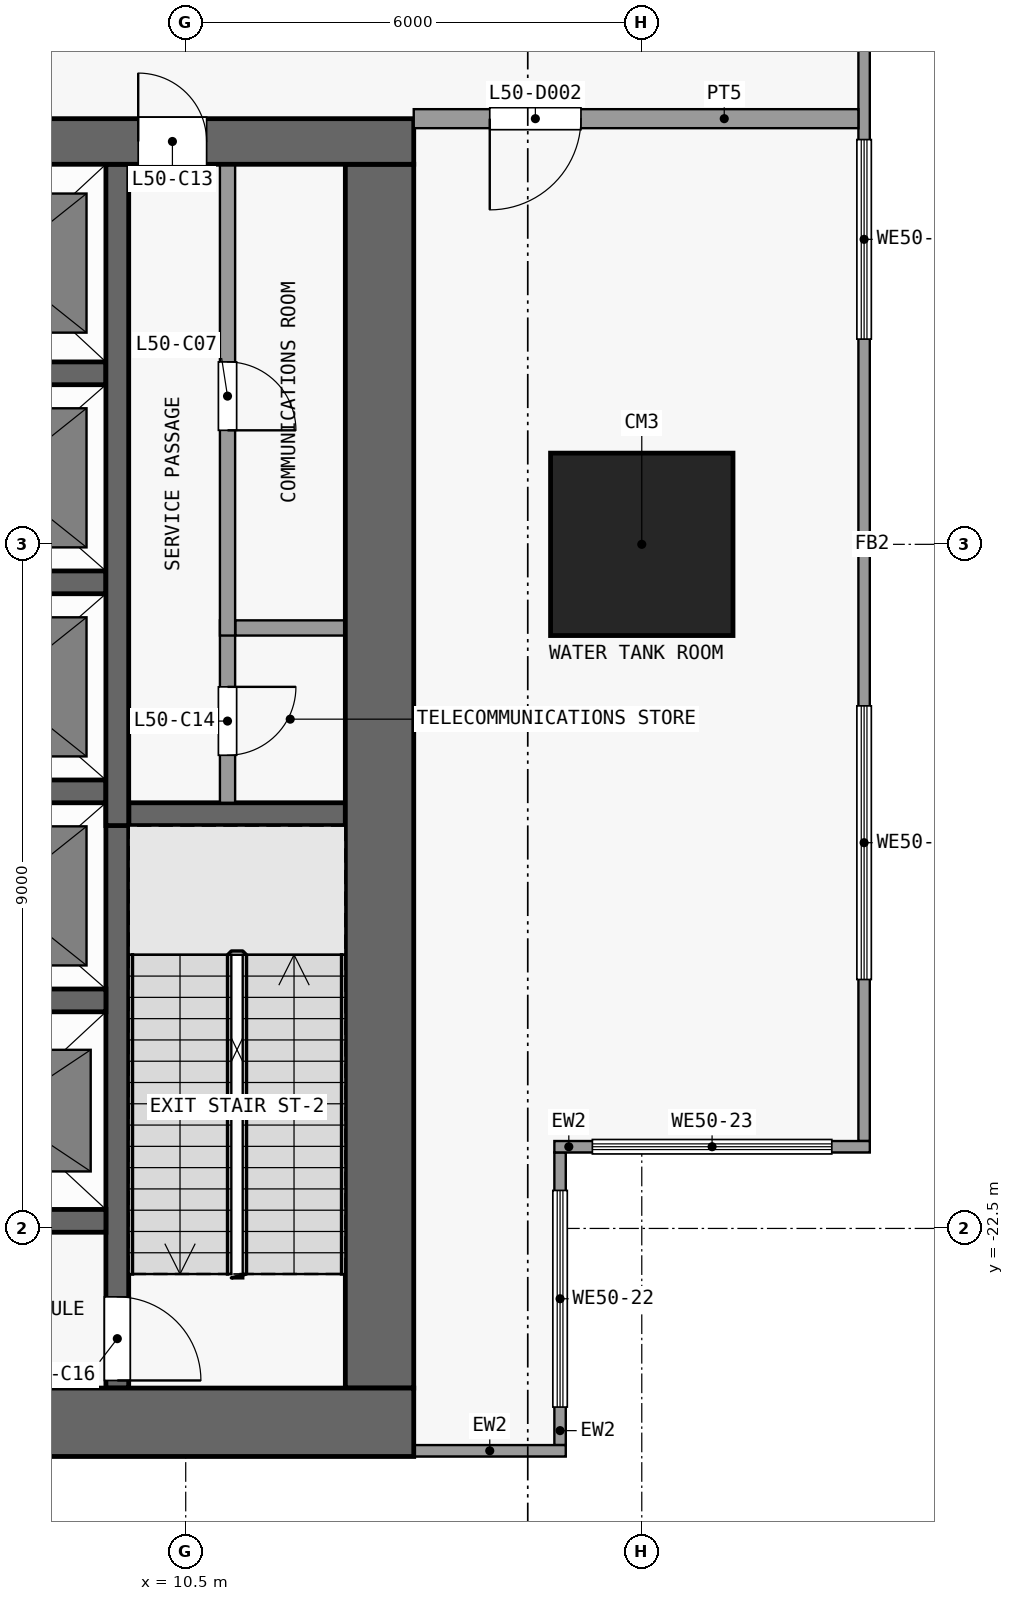
"""IFC4 building model, lengths in metres.
Left out: names, types, materials, properties, quantities, classifications, styles, units other than length and angle.
Written with IfcOpenShell. Run it as: python <this file> out.ifc"""

import sys

from ifc_helpers import new_model, si_unit, direction, frame, frame_2d, origin, origin_2d, place, context, subcontext, project, spatial, rectangle, extrude, element, fill, save


model = new_model("IFC4")
c1 = context("Model", 3, precision=1e-05, world=origin(), true_north=direction((0.0, 1.0)))
c2 = subcontext(c1, "Body", "Model", "MODEL_VIEW")
j1 = project(units=[si_unit("LENGTHUNIT", "METRE"), si_unit("PLANEANGLEUNIT", "RADIAN")], contexts=[c1])
p1 = place(None, origin())
s1 = spatial("IfcSite", under=j1, at=p1, CompositionType="ELEMENT")
p2 = place(p1, origin())
s2 = spatial("IfcBuilding", under=s1, at=p2, CompositionType="ELEMENT")
p3 = place(p2, frame((0.0, 0.0, 199.7)))
s3 = spatial("IfcBuildingStorey", under=s2, at=p3, CompositionType="ELEMENT", Elevation=199.7)
p4 = place(p3, frame((16.5, -13.5, 0.0), z_axis=(0.0, 0.0, 1.0), x_axis=(1.0, 0.0, 0.0)))
e1 = element("IfcColumn", 1, at=p4, inside=s3, PredefinedType="COLUMN", context=c2, shape_type="SweptSolid", body=[
    extrude(rectangle(XDim=2.4, YDim=2.4, at=origin_2d()), origin(), (0.0, 0.0, 1.0), 5.4),
])
p5 = place(p3, frame((-13.5, -25.05, 0.0), z_axis=(0.0, 0.0, 1.0), x_axis=(1.0, 0.0, 0.0)))
e2 = element("IfcWall", 2, at=p5, inside=s3, PredefinedType="SHEAR", context=c2, shape_type="SweptSolid", body=[
    extrude(rectangle(XDim=27.0, YDim=0.9, at=frame_2d((13.5, 0.0))), origin(), (0.0, 0.0, 1.0), 5.0),
])
p6 = place(p3, frame((-13.5, -8.2, 0.0), z_axis=(0.0, 0.0, 1.0), x_axis=(1.0, 0.0, 0.0)))
e3 = element("IfcWall", 3, at=p6, inside=s3, PredefinedType="SHEAR", context=c2, shape_type="SweptSolid", body=[
    extrude(rectangle(XDim=27.0, YDim=0.6, at=frame_2d((13.5, 0.0))), origin(), (0.0, 0.0, 1.0), 5.0),
])
p7 = place(p6, frame((7.8, 0.0, 0.0)))
e4 = element("IfcOpeningElement", 4, at=p7, cuts=e3, PredefinedType="OPENING", context=c2, shape_type="SweptSolid", body=[
    extrude(rectangle(XDim=1.8, YDim=2.1, at=frame_2d((0.9, 1.05))), frame((0.0, 0.31, 0.0), z_axis=(0.0, -1.0, 0.0), x_axis=(1.0, 0.0, 0.0)), (0.0, 0.0, 1.0), 0.62),
])
p8 = place(p6, frame((17.4, 0.0, 0.0)))
e5 = element("IfcOpeningElement", 5, at=p8, cuts=e3, PredefinedType="OPENING", context=c2, shape_type="SweptSolid", body=[
    extrude(rectangle(XDim=1.8, YDim=2.1, at=frame_2d((0.9, 1.05))), frame((0.0, 0.31, 0.0), z_axis=(0.0, -1.0, 0.0), x_axis=(1.0, 0.0, 0.0)), (0.0, 0.0, 1.0), 0.62),
])
p9 = place(p6, frame((1.725, 0.0, 0.0)))
e6 = element("IfcOpeningElement", 6, at=p9, cuts=e3, PredefinedType="OPENING", context=c2, shape_type="SweptSolid", body=[
    extrude(rectangle(XDim=1.2, YDim=2.1, at=frame_2d((0.6, 1.05))), frame((0.0, 0.31, 0.0), z_axis=(0.0, -1.0, 0.0), x_axis=(1.0, 0.0, 0.0)), (0.0, 0.0, 1.0), 0.62),
])
p10 = place(p6, frame((23.375, 0.0, 0.0)))
e7 = element("IfcOpeningElement", 7, at=p10, cuts=e3, PredefinedType="OPENING", context=c2, shape_type="SweptSolid", body=[
    extrude(rectangle(XDim=0.9, YDim=2.1, at=frame_2d((0.45, 1.05))), frame((0.0, 0.31, 0.0), z_axis=(0.0, -1.0, 0.0), x_axis=(1.0, 0.0, 0.0)), (0.0, 0.0, 1.0), 0.62),
])
p11 = place(p3, frame((13.05, -24.6, 0.0), z_axis=(0.0, 0.0, 1.0), x_axis=(0.0, 1.0, 0.0)))
e8 = element("IfcWall", 8, at=p11, inside=s3, PredefinedType="SHEAR", context=c2, shape_type="SweptSolid", body=[
    extrude(rectangle(XDim=16.1, YDim=0.9, at=frame_2d((8.05, 0.0))), origin(), (0.0, 0.0, 1.0), 5.0),
])
for number, where, z_axis, x_axis in (
    (9, (6.65, -22.4, 0.0), (0.0, 0.0, 1.0), (1.0, 0.0, 0.0)),
    (10, (6.65, -19.5, 0.0), (0.0, 0.0, 1.0), (1.0, 0.0, 0.0)),
):
    element("IfcWall", number, at=place(p3, frame(where, z_axis=z_axis, x_axis=x_axis)), inside=s3, PredefinedType="SHEAR", context=c2, shape_type="SweptSolid", body=[
        extrude(rectangle(XDim=2.8, YDim=0.3, at=frame_2d((1.4, 0.0))), origin(), (0.0, 0.0, 1.0), 5.0),
    ])
p12 = place(p3, frame((9.75, -17.05, 0.0), z_axis=(0.0, 0.0, 1.0), x_axis=(1.0, 0.0, 0.0)))
e11 = element("IfcWall", 11, at=p12, inside=s3, PredefinedType="SHEAR", context=c2, shape_type="SweptSolid", body=[
    extrude(rectangle(XDim=2.85, YDim=0.3, at=frame_2d((1.425, 0.0))), origin(), (0.0, 0.0, 1.0), 5.0),
])
p13 = place(p3, frame((6.65, -16.75, 0.0), z_axis=(0.0, 0.0, 1.0), x_axis=(1.0, 0.0, 0.0)))
e12 = element("IfcWall", 12, at=p13, inside=s3, PredefinedType="SHEAR", context=c2, shape_type="SweptSolid", body=[
    extrude(rectangle(XDim=2.8, YDim=0.3, at=frame_2d((1.4, 0.0))), origin(), (0.0, 0.0, 1.0), 5.0),
])
p14 = place(p3, frame((11.15, -14.6, 0.0), z_axis=(0.0, 0.0, 1.0), x_axis=(1.0, 0.0, 0.0)))
e13 = element("IfcWall", 13, at=p14, inside=s3, PredefinedType="PARTITIONING", context=c2, shape_type="SweptSolid", body=[
    extrude(rectangle(XDim=1.45, YDim=0.2, at=frame_2d((0.725, 0.0))), origin(), (0.0, 0.0, 1.0), 5.0),
])
for number, where, z_axis, x_axis in (
    (14, (6.65, -14.0, 0.0), (0.0, 0.0, 1.0), (1.0, 0.0, 0.0)),
    (15, (6.65, -11.25, 0.0), (0.0, 0.0, 1.0), (1.0, 0.0, 0.0)),
):
    element("IfcWall", number, at=place(p3, frame(where, z_axis=z_axis, x_axis=x_axis)), inside=s3, PredefinedType="SHEAR", context=c2, shape_type="SweptSolid", body=[
        extrude(rectangle(XDim=2.8, YDim=0.3, at=frame_2d((1.4, 0.0))), origin(), (0.0, 0.0, 1.0), 5.0),
    ])
p15 = place(p3, frame((9.6, -16.9, 0.0), z_axis=(0.0, 0.0, 1.0), x_axis=(0.0, -1.0, 0.0)))
e16 = element("IfcWall", 16, at=p15, inside=s3, PredefinedType="SHEAR", context=c2, shape_type="SweptSolid", body=[
    extrude(rectangle(XDim=7.7, YDim=0.3, at=frame_2d((3.85, 0.0))), origin(), (0.0, 0.0, 1.0), 5.0),
])
p16 = place(p15, frame((6.5, 0.0, 0.0)))
e17 = element("IfcOpeningElement", 17, at=p16, cuts=e16, PredefinedType="OPENING", context=c2, shape_type="SweptSolid", body=[
    extrude(rectangle(XDim=1.1, YDim=2.1, at=frame_2d((0.55, 1.05))), frame((0.0, 0.16, 0.0), z_axis=(0.0, -1.0, 0.0), x_axis=(1.0, 0.0, 0.0)), (0.0, 0.0, 1.0), 0.32),
])
p17 = place(p3, frame((9.6, -17.2, 0.0), z_axis=(0.0, 0.0, 1.0), x_axis=(0.0, 1.0, 0.0)))
e18 = element("IfcWall", 18, at=p17, inside=s3, PredefinedType="SHEAR", context=c2, shape_type="SweptSolid", body=[
    extrude(rectangle(XDim=8.7, YDim=0.3, at=frame_2d((4.35, 0.0))), origin(), (0.0, 0.0, 1.0), 5.0),
])
p18 = place(p3, frame((11.05, -14.5, 0.0), z_axis=(0.0, 0.0, 1.0), x_axis=(0.0, -1.0, 0.0)))
e19 = element("IfcWall", 19, at=p18, inside=s3, PredefinedType="PARTITIONING", context=c2, shape_type="SweptSolid", body=[
    extrude(rectangle(XDim=2.4, YDim=0.2, at=frame_2d((1.2, 0.0))), origin(), (0.0, 0.0, 1.0), 5.0),
])
p19 = place(p18, frame((0.875, 0.0, 0.0)))
e20 = element("IfcOpeningElement", 20, at=p19, cuts=e19, PredefinedType="OPENING", context=c2, shape_type="SweptSolid", body=[
    extrude(rectangle(XDim=0.9, YDim=2.1, at=frame_2d((0.45, 1.05))), frame((0.0, 0.11, 0.0), z_axis=(0.0, -1.0, 0.0), x_axis=(1.0, 0.0, 0.0)), (0.0, 0.0, 1.0), 0.22),
])
p20 = place(p3, frame((11.05, -8.5, 0.0), z_axis=(0.0, 0.0, 1.0), x_axis=(0.0, -1.0, 0.0)))
e21 = element("IfcWall", 21, at=p20, inside=s3, PredefinedType="PARTITIONING", context=c2, shape_type="SweptSolid", body=[
    extrude(rectangle(XDim=6.2, YDim=0.2, at=frame_2d((3.1, 0.0))), origin(), (0.0, 0.0, 1.0), 5.0),
])
p21 = place(p20, frame((2.6, 0.0, 0.0)))
e22 = element("IfcOpeningElement", 22, at=p21, cuts=e21, PredefinedType="OPENING", context=c2, shape_type="SweptSolid", body=[
    extrude(rectangle(XDim=0.9, YDim=2.1, at=frame_2d((0.45, 1.05))), frame((0.0, 0.11, 0.0), z_axis=(0.0, -1.0, 0.0), x_axis=(1.0, 0.0, 0.0)), (0.0, 0.0, 1.0), 0.22),
])
p22 = place(p3, frame((19.425, 18.35, 0.0), z_axis=(0.0, 0.0, 1.0), x_axis=(0.0, -1.0, 0.0)))
e23 = element("IfcWall", 23, at=p22, inside=s3, PredefinedType="SOLIDWALL", context=c2, shape_type="SweptSolid", body=[
    extrude(rectangle(XDim=39.7, YDim=0.15, at=frame_2d((19.85, 0.0))), origin(), (0.0, 0.0, 1.0), 5.0),
])
p23 = place(p22, frame((33.975, 0.0, 1.2)))
e24 = element("IfcOpeningElement", 24, at=p23, cuts=e23, PredefinedType="OPENING", context=c2, shape_type="SweptSolid", body=[
    extrude(rectangle(XDim=3.6, YDim=3.0, at=frame_2d((1.8, 1.5))), frame((0.0, 0.085, 0.0), z_axis=(0.0, -1.0, 0.0), x_axis=(1.0, 0.0, 0.0)), (0.0, 0.0, 1.0), 0.17),
])
p24 = place(p22, frame((26.525, 0.0, 1.2)))
e25 = element("IfcOpeningElement", 25, at=p24, cuts=e23, PredefinedType="OPENING", context=c2, shape_type="SweptSolid", body=[
    extrude(rectangle(XDim=2.625, YDim=3.0, at=frame_2d((1.312, 1.5))), frame((0.0, 0.085, 0.0), z_axis=(0.0, -1.0, 0.0), x_axis=(1.0, 0.0, 0.0)), (0.0, 0.0, 1.0), 0.17),
])
p25 = place(p22, frame((18.05, 0.0, 1.2)))
e26 = element("IfcOpeningElement", 26, at=p25, cuts=e23, PredefinedType="OPENING", context=c2, shape_type="SweptSolid", body=[
    extrude(rectangle(XDim=3.6, YDim=3.0, at=frame_2d((1.8, 1.5))), frame((0.0, 0.085, 0.0), z_axis=(0.0, -1.0, 0.0), x_axis=(1.0, 0.0, 0.0)), (0.0, 0.0, 1.0), 0.17),
])
p26 = place(p22, frame((12.05, 0.0, 1.2)))
e27 = element("IfcOpeningElement", 27, at=p26, cuts=e23, PredefinedType="OPENING", context=c2, shape_type="SweptSolid", body=[
    extrude(rectangle(XDim=3.6, YDim=3.0, at=frame_2d((1.8, 1.5))), frame((0.0, 0.085, 0.0), z_axis=(0.0, -1.0, 0.0), x_axis=(1.0, 0.0, 0.0)), (0.0, 0.0, 1.0), 0.17),
])
p27 = place(p22, frame((8.125, 0.0, 1.2)))
e28 = element("IfcOpeningElement", 28, at=p27, cuts=e23, PredefinedType="OPENING", context=c2, shape_type="SweptSolid", body=[
    extrude(rectangle(XDim=1.525, YDim=3.0, at=frame_2d((0.762, 1.5))), frame((0.0, 0.085, 0.0), z_axis=(0.0, -1.0, 0.0), x_axis=(1.0, 0.0, 0.0)), (0.0, 0.0, 1.0), 0.17),
])
p28 = place(p22, frame((6.05, 0.0, 1.2)))
e29 = element("IfcOpeningElement", 29, at=p28, cuts=e23, PredefinedType="OPENING", context=c2, shape_type="SweptSolid", body=[
    extrude(rectangle(XDim=1.525, YDim=3.0, at=frame_2d((0.762, 1.5))), frame((0.0, 0.085, 0.0), z_axis=(0.0, -1.0, 0.0), x_axis=(1.0, 0.0, 0.0)), (0.0, 0.0, 1.0), 0.17),
])
p29 = place(p22, frame((0.625, 0.0, 1.2)))
e30 = element("IfcOpeningElement", 30, at=p29, cuts=e23, PredefinedType="OPENING", context=c2, shape_type="SweptSolid", body=[
    extrude(rectangle(XDim=3.6, YDim=3.0, at=frame_2d((1.8, 1.5))), frame((0.0, 0.085, 0.0), z_axis=(0.0, -1.0, 0.0), x_axis=(1.0, 0.0, 0.0)), (0.0, 0.0, 1.0), 0.17),
])
p30 = place(p3, frame((15.5, -25.425, 0.0), z_axis=(0.0, 0.0, 1.0), x_axis=(-1.0, 0.0, 0.0)))
e31 = element("IfcWall", 31, at=p30, inside=s3, PredefinedType="SOLIDWALL", context=c2, shape_type="SweptSolid", body=[
    extrude(rectangle(XDim=2.0, YDim=0.15, at=frame_2d((1.0, 0.0))), origin(), (0.0, 0.0, 1.0), 5.0),
])
p31 = place(p3, frame((15.425, -21.5, 0.0), z_axis=(0.0, 0.0, 1.0), x_axis=(0.0, -1.0, 0.0)))
e32 = element("IfcWall", 32, at=p31, inside=s3, PredefinedType="SOLIDWALL", context=c2, shape_type="SweptSolid", body=[
    extrude(rectangle(XDim=3.85, YDim=0.15, at=frame_2d((1.925, 0.0))), origin(), (0.0, 0.0, 1.0), 5.0),
])
p32 = place(p31, frame((0.5, 0.0, 1.2)))
e33 = element("IfcOpeningElement", 33, at=p32, cuts=e32, PredefinedType="OPENING", context=c2, shape_type="SweptSolid", body=[
    extrude(rectangle(XDim=2.85, YDim=3.0, at=frame_2d((1.425, 1.5))), frame((0.0, 0.085, 0.0), z_axis=(0.0, -1.0, 0.0), x_axis=(1.0, 0.0, 0.0)), (0.0, 0.0, 1.0), 0.17),
])
p33 = place(p3, frame((19.5, -21.425, 0.0), z_axis=(0.0, 0.0, 1.0), x_axis=(-1.0, 0.0, 0.0)))
e34 = element("IfcWall", 34, at=p33, inside=s3, PredefinedType="SOLIDWALL", context=c2, shape_type="SweptSolid", body=[
    extrude(rectangle(XDim=4.15, YDim=0.15, at=frame_2d((2.075, 0.0))), origin(), (0.0, 0.0, 1.0), 5.0),
])
p34 = place(p33, frame((0.5, 0.0, 1.2)))
e35 = element("IfcOpeningElement", 35, at=p34, cuts=e34, PredefinedType="OPENING", context=c2, shape_type="SweptSolid", body=[
    extrude(rectangle(XDim=3.15, YDim=3.0, at=frame_2d((1.575, 1.5))), frame((0.0, 0.085, 0.0), z_axis=(0.0, -1.0, 0.0), x_axis=(1.0, 0.0, 0.0)), (0.0, 0.0, 1.0), 0.17),
])
p35 = place(p3, frame((13.5, -7.9, 0.0), z_axis=(0.0, 0.0, 1.0), x_axis=(1.0, 0.0, 0.0)))
e36 = element("IfcWall", 36, at=p35, inside=s3, PredefinedType="PARTITIONING", context=c2, shape_type="SweptSolid", body=[
    extrude(rectangle(XDim=5.85, YDim=0.25, at=frame_2d((2.925, 0.0))), origin(), (0.0, 0.0, 1.0), 5.0),
])
p36 = place(p35, frame((1.0, 0.0, 0.0)))
e37 = element("IfcOpeningElement", 37, at=p36, cuts=e36, PredefinedType="OPENING", context=c2, shape_type="SweptSolid", body=[
    extrude(rectangle(XDim=1.2, YDim=2.1, at=frame_2d((0.6, 1.05))), frame((0.0, 0.135, 0.0), z_axis=(0.0, -1.0, 0.0), x_axis=(1.0, 0.0, 0.0)), (0.0, 0.0, 1.0), 0.27),
])
p37 = place(p21, origin())
e38 = element("IfcDoor", 38, at=p37, inside=s3, OperationType="SINGLE_SWING_RIGHT", PredefinedType="DOOR", context=c2, shape_type="SweptSolid", body=[
    extrude(rectangle(XDim=0.9, YDim=2.1, at=frame_2d((0.45, 1.05))), frame((0.0, 0.025, 0.0), z_axis=(0.0, -1.0, 0.0), x_axis=(1.0, 0.0, 0.0)), (0.0, 0.0, 1.0), 0.05),
])
fill(e22, e38)
p38 = place(p10, origin())
e39 = element("IfcDoor", 39, at=p38, inside=s3, OperationType="SINGLE_SWING_LEFT", PredefinedType="DOOR", context=c2, shape_type="SweptSolid", body=[
    extrude(rectangle(XDim=0.9, YDim=2.1, at=frame_2d((0.45, 1.05))), frame((0.0, 0.025, 0.0), z_axis=(0.0, -1.0, 0.0), x_axis=(1.0, 0.0, 0.0)), (0.0, 0.0, 1.0), 0.05),
])
fill(e7, e39)
p39 = place(p19, origin())
e40 = element("IfcDoor", 40, at=p39, inside=s3, OperationType="SINGLE_SWING_LEFT", PredefinedType="DOOR", context=c2, shape_type="SweptSolid", body=[
    extrude(rectangle(XDim=0.9, YDim=2.1, at=frame_2d((0.45, 1.05))), frame((0.0, 0.025, 0.0), z_axis=(0.0, -1.0, 0.0), x_axis=(1.0, 0.0, 0.0)), (0.0, 0.0, 1.0), 0.05),
])
fill(e20, e40)
p40 = place(p16, origin())
e41 = element("IfcDoor", 41, at=p40, inside=s3, OperationType="SINGLE_SWING_RIGHT", PredefinedType="DOOR", context=c2, shape_type="SweptSolid", body=[
    extrude(rectangle(XDim=1.1, YDim=2.1, at=frame_2d((0.55, 1.05))), frame((0.0, 0.025, 0.0), z_axis=(0.0, -1.0, 0.0), x_axis=(1.0, 0.0, 0.0)), (0.0, 0.0, 1.0), 0.05),
])
fill(e17, e41)
p41 = place(p23, origin())
e42 = element("IfcWindow", 42, at=p41, inside=s3, PartitioningType="SINGLE_PANEL", PredefinedType="WINDOW", context=c2, shape_type="SweptSolid", body=[
    extrude(rectangle(XDim=3.6, YDim=3.0, at=frame_2d((1.8, 1.5))), frame((0.0, 0.03, 0.0), z_axis=(0.0, -1.0, 0.0), x_axis=(1.0, 0.0, 0.0)), (0.0, 0.0, 1.0), 0.06),
])
fill(e24, e42)
p42 = place(p24, origin())
e43 = element("IfcWindow", 43, at=p42, inside=s3, PartitioningType="SINGLE_PANEL", PredefinedType="WINDOW", context=c2, shape_type="SweptSolid", body=[
    extrude(rectangle(XDim=2.625, YDim=3.0, at=frame_2d((1.312, 1.5))), frame((0.0, 0.03, 0.0), z_axis=(0.0, -1.0, 0.0), x_axis=(1.0, 0.0, 0.0)), (0.0, 0.0, 1.0), 0.06),
])
fill(e25, e43)
p43 = place(p32, origin())
e44 = element("IfcWindow", 44, at=p43, inside=s3, PartitioningType="SINGLE_PANEL", PredefinedType="WINDOW", context=c2, shape_type="SweptSolid", body=[
    extrude(rectangle(XDim=2.85, YDim=3.0, at=frame_2d((1.425, 1.5))), frame((0.0, 0.03, 0.0), z_axis=(0.0, -1.0, 0.0), x_axis=(1.0, 0.0, 0.0)), (0.0, 0.0, 1.0), 0.06),
])
fill(e33, e44)
p44 = place(p34, origin())
e45 = element("IfcWindow", 45, at=p44, inside=s3, PartitioningType="SINGLE_PANEL", PredefinedType="WINDOW", context=c2, shape_type="SweptSolid", body=[
    extrude(rectangle(XDim=3.15, YDim=3.0, at=frame_2d((1.575, 1.5))), frame((0.0, 0.03, 0.0), z_axis=(0.0, -1.0, 0.0), x_axis=(1.0, 0.0, 0.0)), (0.0, 0.0, 1.0), 0.06),
])
fill(e35, e45)
p45 = place(p36, origin())
e46 = element("IfcDoor", 46, at=p45, inside=s3, OperationType="SINGLE_SWING_LEFT", PredefinedType="DOOR", context=c2, shape_type="SweptSolid", body=[
    extrude(rectangle(XDim=1.2, YDim=2.1, at=frame_2d((0.6, 1.05))), frame((0.0, 0.025, 0.0), z_axis=(0.0, -1.0, 0.0), x_axis=(1.0, 0.0, 0.0)), (0.0, 0.0, 1.0), 0.05),
])
fill(e37, e46)
save(model, sys.argv[1])
